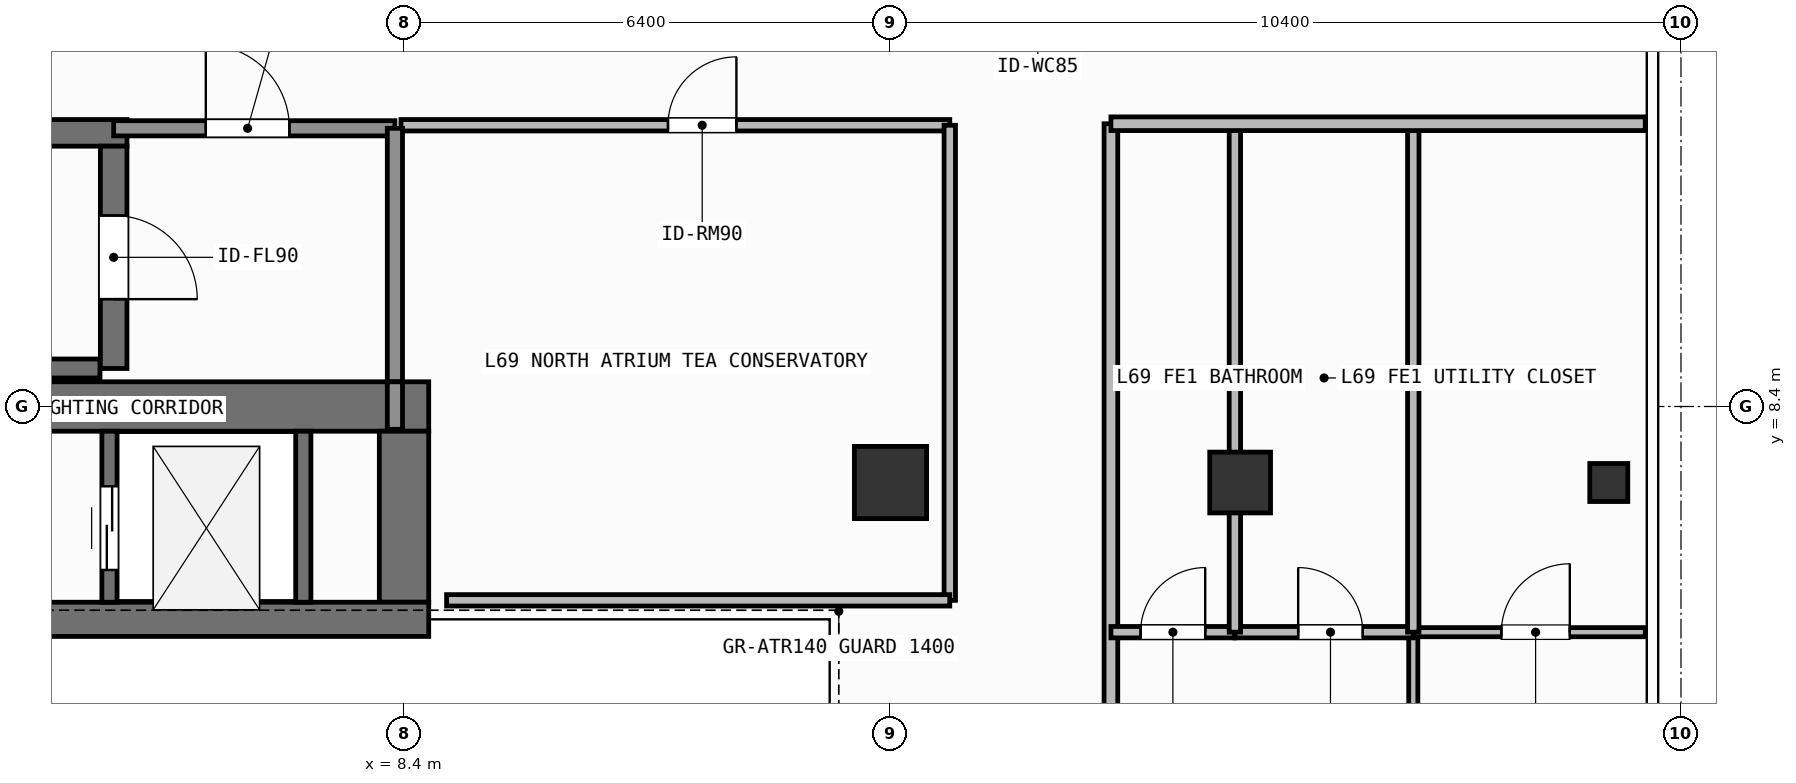
"""IFC4 building model, lengths in metres.
Left out: names, types, materials, properties, quantities, classifications, styles, units other than length and angle.
Written with IfcOpenShell. Run it as: python <this file> out.ifc"""

import sys

from ifc_helpers import new_model, si_unit, direction, frame, frame_2d, origin, origin_2d, place, context, subcontext, project, spatial, rectangle, hollow_rectangle, extrude, element, fill, save


model = new_model("IFC4")
c1 = context("Model", 3, precision=1e-05, world=origin(), true_north=direction((0.0, 1.0)))
c2 = subcontext(c1, "Body", "Model", "MODEL_VIEW")
j1 = project(units=[si_unit("LENGTHUNIT", "METRE"), si_unit("PLANEANGLEUNIT", "RADIAN")], contexts=[c1])
p1 = place(None, origin())
s1 = spatial("IfcSite", under=j1, at=p1, CompositionType="ELEMENT")
p2 = place(p1, origin())
s2 = spatial("IfcBuilding", under=s1, at=p2, CompositionType="ELEMENT")
p3 = place(p2, frame((0.0, 0.0, 282.0)))
s3 = spatial("IfcBuildingStorey", under=s2, at=p3, CompositionType="ELEMENT", Elevation=282.0)
p4 = place(p3, frame((-7.55, 8.4, 0.0), z_axis=(0.0, 0.0, 1.0), x_axis=(1.0, 0.0, 0.0)))
e1 = element("IfcWall", 1, at=p4, inside=s3, PredefinedType="SHEAR", context=c2, shape_type="SweptSolid", body=[
    extrude(rectangle(XDim=16.275, YDim=0.65, at=frame_2d((8.138, 0.0))), origin(), (0.0, 0.0, 1.0), 3.9),
])
p5 = place(p3, frame((8.4, 5.825, 0.0), z_axis=(0.0, 0.0, 1.0), x_axis=(0.0, 1.0, 0.0)))
e2 = element("IfcWall", 2, at=p5, inside=s3, PredefinedType="SHEAR", context=c2, shape_type="SweptSolid", body=[
    extrude(rectangle(XDim=2.25, YDim=0.65, at=frame_2d((1.125, 0.0))), origin(), (0.0, 0.0, 1.0), 3.9),
])
p6 = place(p3, frame((3.045, 5.6, 0.0), z_axis=(0.0, 0.0, 1.0), x_axis=(1.0, 0.0, 0.0)))
e3 = element("IfcWall", 3, at=p6, inside=s3, PredefinedType="SHEAR", context=c2, shape_type="SweptSolid", body=[
    extrude(rectangle(XDim=5.68, YDim=0.45, at=frame_2d((2.84, 0.0))), origin(), (0.0, 0.0, 1.0), 3.9),
])
p7 = place(p3, frame((-2.555, 12.0, 0.0), z_axis=(0.0, 0.0, 1.0), x_axis=(1.0, 0.0, 0.0)))
e4 = element("IfcWall", 4, at=p7, inside=s3, PredefinedType="SHEAR", context=c2, shape_type="SweptSolid", body=[
    extrude(rectangle(XDim=7.31, YDim=0.35, at=frame_2d((3.655, 0.0))), origin(), (0.0, 0.0, 1.0), 3.9),
])
p8 = place(p3, frame((-2.2, 8.9, 0.0), z_axis=(0.0, 0.0, 1.0), x_axis=(1.0, 0.0, 0.0)))
e5 = element("IfcWall", 5, at=p8, inside=s3, PredefinedType="SHEAR", context=c2, shape_type="SweptSolid", body=[
    extrude(rectangle(XDim=6.6, YDim=0.25, at=frame_2d((3.3, 0.0))), origin(), (0.0, 0.0, 1.0), 3.9),
])
p9 = place(p3, frame((4.58, 11.825, 0.0), z_axis=(0.0, 0.0, 1.0), x_axis=(0.0, -1.0, 0.0)))
e6 = element("IfcWall", 6, at=p9, inside=s3, PredefinedType="SHEAR", context=c2, shape_type="SweptSolid", body=[
    extrude(rectangle(XDim=2.925, YDim=0.35, at=frame_2d((1.462, 0.0))), origin(), (0.0, 0.0, 1.0), 3.9),
])
p10 = place(p9, frame((0.913, 0.0, 0.0)))
e7 = element("IfcOpeningElement", 7, at=p10, cuts=e6, PredefinedType="OPENING", context=c2, shape_type="SweptSolid", body=[
    extrude(rectangle(XDim=1.1, YDim=2.15, at=frame_2d((0.55, 1.075))), frame((0.0, 0.185, 0.0), z_axis=(0.0, -1.0, 0.0), x_axis=(1.0, 0.0, 0.0)), (0.0, 0.0, 1.0), 0.37),
])
p11 = place(p3, frame((14.8, 7.4, 0.0), z_axis=(0.0, 0.0, 1.0), x_axis=(1.0, 0.0, 0.0)))
e8 = element("IfcColumn", 8, at=p11, inside=s3, PredefinedType="COLUMN", context=c2, shape_type="SweptSolid", body=[
    extrude(rectangle(XDim=0.95, YDim=0.95, at=origin_2d()), origin(), (0.0, 0.0, 1.0), 3.9),
])
p12 = place(p3, frame((19.4, 7.4, 0.0), z_axis=(0.0, 0.0, 1.0), x_axis=(1.0, 0.0, 0.0)))
e9 = element("IfcColumn", 9, at=p12, inside=s3, PredefinedType="COLUMN", context=c2, shape_type="SweptSolid", body=[
    extrude(hollow_rectangle(XDim=0.8, YDim=0.8, WallThickness=0.036, at=origin_2d()), origin(), (0.0, 0.0, 1.0), 3.9),
])
p13 = place(p3, frame((24.25, 7.4, 0.0), z_axis=(0.0, 0.0, 1.0), x_axis=(1.0, 0.0, 0.0)))
e10 = element("IfcColumn", 10, at=p13, inside=s3, PredefinedType="COLUMN", context=c2, shape_type="SweptSolid", body=[
    extrude(hollow_rectangle(XDim=0.5, YDim=0.5, WallThickness=0.025, at=origin_2d()), origin(), (0.0, 0.0, 1.0), 3.9),
])
p14 = place(p3, frame((4.525, 5.825, 0.0), z_axis=(0.0, 0.0, 1.0), x_axis=(0.0, 1.0, 0.0)))
e11 = element("IfcWall", 11, at=p14, inside=s3, PredefinedType="SHEAR", context=c2, shape_type="SweptSolid", body=[
    extrude(rectangle(XDim=2.25, YDim=0.2, at=frame_2d((1.125, 0.0))), origin(), (0.0, 0.0, 1.0), 3.62),
])
p15 = place(p14, frame((0.425, 0.0, 0.0)))
e12 = element("IfcOpeningElement", 12, at=p15, cuts=e11, PredefinedType="OPENING", context=c2, shape_type="SweptSolid", body=[
    extrude(rectangle(XDim=1.1, YDim=2.2, at=frame_2d((0.55, 1.1))), frame((0.0, 0.11, 0.0), z_axis=(0.0, -1.0, 0.0), x_axis=(1.0, 0.0, 0.0)), (0.0, 0.0, 1.0), 0.22),
])
p16 = place(p3, frame((7.075, 5.825, 0.0), z_axis=(0.0, 0.0, 1.0), x_axis=(0.0, 1.0, 0.0)))
e13 = element("IfcWall", 13, at=p16, inside=s3, PredefinedType="SHEAR", context=c2, shape_type="SweptSolid", body=[
    extrude(rectangle(XDim=2.25, YDim=0.2, at=frame_2d((1.125, 0.0))), origin(), (0.0, 0.0, 1.0), 3.62),
])
p17 = place(p3, frame((4.58, 12.06, 0.0), z_axis=(0.0, 0.0, 1.0), x_axis=(1.0, 0.0, 0.0)))
e14 = element("IfcWall", 14, at=p17, inside=s3, PredefinedType="SOLIDWALL", context=c2, shape_type="SweptSolid", body=[
    extrude(rectangle(XDim=3.7, YDim=0.2, at=frame_2d((1.85, 0.0))), origin(), (0.0, 0.0, 1.0), 3.62),
])
p18 = place(p17, frame((1.212, 0.0, 0.0)))
e15 = element("IfcOpeningElement", 15, at=p18, cuts=e14, PredefinedType="OPENING", context=c2, shape_type="SweptSolid", body=[
    extrude(rectangle(XDim=1.1, YDim=2.15, at=frame_2d((0.55, 1.075))), frame((0.0, 0.11, 0.0), z_axis=(0.0, -1.0, 0.0), x_axis=(1.0, 0.0, 0.0)), (0.0, 0.0, 1.0), 0.22),
])
p19 = place(p3, frame((8.36, 12.1, 0.0), z_axis=(0.0, 0.0, 1.0), x_axis=(1.0, 0.0, 0.0)))
e16 = element("IfcWall", 16, at=p19, inside=s3, PredefinedType="PARTITIONING", context=c2, shape_type="SweptSolid", body=[
    extrude(rectangle(XDim=7.22, YDim=0.15, at=frame_2d((3.61, 0.0))), origin(), (0.0, 0.0, 1.0), 3.62),
])
p20 = place(p19, frame((3.513, 0.0, 0.0)))
e17 = element("IfcOpeningElement", 17, at=p20, cuts=e16, PredefinedType="OPENING", context=c2, shape_type="SweptSolid", body=[
    extrude(rectangle(XDim=0.9, YDim=2.1, at=frame_2d((0.45, 1.05))), frame((0.0, 0.085, 0.0), z_axis=(0.0, -1.0, 0.0), x_axis=(1.0, 0.0, 0.0)), (0.0, 0.0, 1.0), 0.17),
])
p21 = place(p3, frame((17.7, -12.12, 0.0), z_axis=(0.0, 0.0, 1.0), x_axis=(0.0, 1.0, 0.0)))
e18 = element("IfcWall", 18, at=p21, inside=s3, PredefinedType="PARTITIONING", context=c2, shape_type="SweptSolid", body=[
    extrude(rectangle(XDim=24.24, YDim=0.18, at=frame_2d((12.12, 0.0))), origin(), (0.0, 0.0, 1.0), 3.62),
])
p22 = place(p21, frame((11.62, 0.0, 0.0)))
e19 = element("IfcOpeningElement", 19, at=p22, cuts=e18, PredefinedType="OPENING", context=c2, shape_type="SweptSolid", body=[
    extrude(rectangle(XDim=1.0, YDim=2.2, at=frame_2d((0.5, 1.1))), frame((0.0, 0.1, 0.0), z_axis=(0.0, -1.0, 0.0), x_axis=(1.0, 0.0, 0.0)), (0.0, 0.0, 1.0), 0.2),
])
p23 = place(p3, frame((21.678, -5.431, 0.0), z_axis=(0.0, 0.0, 1.0), x_axis=(0.0, 1.0, 0.0)))
e20 = element("IfcWall", 20, at=p23, inside=s3, PredefinedType="PARTITIONING", context=c2, shape_type="SweptSolid", body=[
    extrude(rectangle(XDim=10.862, YDim=0.12, at=frame_2d((5.431, 0.0))), origin(), (0.0, 0.0, 1.0), 3.62),
])
p24 = place(p23, frame((4.981, 0.0, 0.0)))
e21 = element("IfcOpeningElement", 21, at=p24, cuts=e20, PredefinedType="OPENING", context=c2, shape_type="SweptSolid", body=[
    extrude(rectangle(XDim=0.9, YDim=2.1, at=frame_2d((0.45, 1.05))), frame((0.0, 0.07, 0.0), z_axis=(0.0, -1.0, 0.0), x_axis=(1.0, 0.0, 0.0)), (0.0, 0.0, 1.0), 0.14),
])
p25 = place(p3, frame((17.7, 5.431, 0.0), z_axis=(0.0, 0.0, 1.0), x_axis=(1.0, 0.0, 0.0)))
e22 = element("IfcWall", 22, at=p25, inside=s3, PredefinedType="PARTITIONING", context=c2, shape_type="SweptSolid", body=[
    extrude(rectangle(XDim=1.631, YDim=0.15, at=frame_2d((0.815, 0.0))), origin(), (0.0, 0.0, 1.0), 3.62),
])
p26 = place(p25, frame((0.39, 0.0, 0.0)))
e23 = element("IfcOpeningElement", 23, at=p26, cuts=e22, PredefinedType="OPENING", context=c2, shape_type="SweptSolid", body=[
    extrude(rectangle(XDim=0.85, YDim=2.1, at=frame_2d((0.425, 1.05))), frame((0.0, 0.085, 0.0), z_axis=(0.0, -1.0, 0.0), x_axis=(1.0, 0.0, 0.0)), (0.0, 0.0, 1.0), 0.17),
])
p27 = place(p3, frame((19.331, 5.431, 0.0), z_axis=(0.0, 0.0, 1.0), x_axis=(1.0, 0.0, 0.0)))
e24 = element("IfcWall", 24, at=p27, inside=s3, PredefinedType="PARTITIONING", context=c2, shape_type="SweptSolid", body=[
    extrude(rectangle(XDim=2.347, YDim=0.15, at=frame_2d((1.173, 0.0))), origin(), (0.0, 0.0, 1.0), 3.62),
])
p28 = place(p27, frame((0.833, 0.0, 0.0)))
e25 = element("IfcOpeningElement", 25, at=p28, cuts=e24, PredefinedType="OPENING", context=c2, shape_type="SweptSolid", body=[
    extrude(rectangle(XDim=0.85, YDim=2.1, at=frame_2d((0.425, 1.05))), frame((0.0, 0.085, 0.0), z_axis=(0.0, -1.0, 0.0), x_axis=(1.0, 0.0, 0.0)), (0.0, 0.0, 1.0), 0.17),
])
p29 = place(p3, frame((21.678, 5.431, 0.0), z_axis=(0.0, 0.0, 1.0), x_axis=(1.0, 0.0, 0.0)))
e26 = element("IfcWall", 26, at=p29, inside=s3, PredefinedType="PARTITIONING", context=c2, shape_type="SweptSolid", body=[
    extrude(rectangle(XDim=3.052, YDim=0.12, at=frame_2d((1.526, 0.0))), origin(), (0.0, 0.0, 1.0), 3.62),
])
p30 = place(p29, frame((1.159, 0.0, 0.0)))
e27 = element("IfcOpeningElement", 27, at=p30, cuts=e26, PredefinedType="OPENING", context=c2, shape_type="SweptSolid", body=[
    extrude(rectangle(XDim=0.9, YDim=2.1, at=frame_2d((0.45, 1.05))), frame((0.0, 0.07, 0.0), z_axis=(0.0, -1.0, 0.0), x_axis=(1.0, 0.0, 0.0)), (0.0, 0.0, 1.0), 0.14),
])
p31 = place(p3, frame((8.28, 8.725, 0.0), z_axis=(0.0, 0.0, 1.0), x_axis=(0.0, 1.0, 0.0)))
e28 = element("IfcWall", 28, at=p31, inside=s3, PredefinedType="SOLIDWALL", context=c2, shape_type="SweptSolid", body=[
    extrude(rectangle(XDim=3.335, YDim=0.2, at=frame_2d((1.667, 0.0))), origin(), (0.0, 0.0, 1.0), 3.62),
])
p32 = place(p3, frame((8.28, 8.1, 0.0), z_axis=(0.0, 0.0, 1.0), x_axis=(0.0, 1.0, 0.0)))
e29 = element("IfcWall", 29, at=p32, inside=s3, PredefinedType="SOLIDWALL", context=c2, shape_type="SweptSolid", body=[
    extrude(rectangle(XDim=0.625, YDim=0.2, at=frame_2d((0.312, 0.0))), origin(), (0.0, 0.0, 1.0), 3.62),
])
p33 = place(p3, frame((15.58, 5.85, 0.0), z_axis=(0.0, 0.0, 1.0), x_axis=(0.0, 1.0, 0.0)))
e30 = element("IfcWall", 30, at=p33, inside=s3, PredefinedType="PARTITIONING", context=c2, shape_type="SweptSolid", body=[
    extrude(rectangle(XDim=6.25, YDim=0.15, at=frame_2d((3.125, 0.0))), origin(), (0.0, 0.0, 1.0), 3.62),
])
p34 = place(p3, frame((8.96, 5.85, 0.0), z_axis=(0.0, 0.0, 1.0), x_axis=(1.0, 0.0, 0.0)))
e31 = element("IfcWall", 31, at=p34, inside=s3, PredefinedType="PARTITIONING", context=c2, shape_type="SweptSolid", body=[
    extrude(rectangle(XDim=6.62, YDim=0.15, at=frame_2d((3.31, 0.0))), origin(), (0.0, 0.0, 1.0), 3.62),
])
for number, where, z_axis, x_axis in (
    (32, (19.331, 5.431, 0.0), (0.0, 0.0, 1.0), (0.0, 1.0, 0.0)),
    (33, (21.678, 5.431, 0.0), (0.0, 0.0, 1.0), (0.0, 1.0, 0.0)),
):
    element("IfcWall", number, at=place(p3, frame(where, z_axis=z_axis, x_axis=x_axis)), inside=s3, PredefinedType="PARTITIONING", context=c2, shape_type="SweptSolid", body=[
        extrude(rectangle(XDim=6.689, YDim=0.15, at=frame_2d((3.345, 0.0))), origin(), (0.0, 0.0, 1.0), 3.62),
    ])
p35 = place(p3, frame((17.7, 12.12, 0.0), z_axis=(0.0, 0.0, 1.0), x_axis=(1.0, 0.0, 0.0)))
e34 = element("IfcWall", 34, at=p35, inside=s3, PredefinedType="PARTITIONING", context=c2, shape_type="SweptSolid", body=[
    extrude(rectangle(XDim=7.03, YDim=0.18, at=frame_2d((3.515, 0.0))), origin(), (0.0, 0.0, 1.0), 3.62),
])
p36 = place(p15, origin())
e35 = element("IfcDoor", 35, at=p36, inside=s3, OperationType="SLIDING_TO_LEFT", PredefinedType="DOOR", context=c2, shape_type="SweptSolid", body=[
    extrude(rectangle(XDim=1.1, YDim=2.2, at=frame_2d((0.55, 1.1))), frame((0.0, 0.025, 0.0), z_axis=(0.0, -1.0, 0.0), x_axis=(1.0, 0.0, 0.0)), (0.0, 0.0, 1.0), 0.05),
])
fill(e12, e35)
p37 = place(p10, origin())
e36 = element("IfcDoor", 36, at=p37, inside=s3, OperationType="SINGLE_SWING_RIGHT", PredefinedType="DOOR", context=c2, shape_type="SweptSolid", body=[
    extrude(rectangle(XDim=1.1, YDim=2.15, at=frame_2d((0.55, 1.075))), frame((0.0, 0.025, 0.0), z_axis=(0.0, -1.0, 0.0), x_axis=(1.0, 0.0, 0.0)), (0.0, 0.0, 1.0), 0.05),
])
fill(e7, e36)
p38 = place(p18, origin())
e37 = element("IfcDoor", 37, at=p38, inside=s3, OperationType="SINGLE_SWING_LEFT", PredefinedType="DOOR", context=c2, shape_type="SweptSolid", body=[
    extrude(rectangle(XDim=1.1, YDim=2.15, at=frame_2d((0.55, 1.075))), frame((0.0, 0.025, 0.0), z_axis=(0.0, -1.0, 0.0), x_axis=(1.0, 0.0, 0.0)), (0.0, 0.0, 1.0), 0.05),
])
fill(e15, e37)
p39 = place(p20, origin())
e38 = element("IfcDoor", 38, at=p39, inside=s3, OperationType="SINGLE_SWING_RIGHT", PredefinedType="DOOR", context=c2, shape_type="SweptSolid", body=[
    extrude(rectangle(XDim=0.9, YDim=2.1, at=frame_2d((0.45, 1.05))), frame((0.0, 0.025, 0.0), z_axis=(0.0, -1.0, 0.0), x_axis=(1.0, 0.0, 0.0)), (0.0, 0.0, 1.0), 0.05),
])
fill(e17, e38)
p40 = place(p26, origin())
e39 = element("IfcDoor", 39, at=p40, inside=s3, OperationType="SINGLE_SWING_RIGHT", PredefinedType="DOOR", context=c2, shape_type="SweptSolid", body=[
    extrude(rectangle(XDim=0.85, YDim=2.1, at=frame_2d((0.425, 1.05))), frame((0.0, 0.025, 0.0), z_axis=(0.0, -1.0, 0.0), x_axis=(1.0, 0.0, 0.0)), (0.0, 0.0, 1.0), 0.05),
])
fill(e23, e39)
p41 = place(p28, origin())
e40 = element("IfcDoor", 40, at=p41, inside=s3, OperationType="SINGLE_SWING_LEFT", PredefinedType="DOOR", context=c2, shape_type="SweptSolid", body=[
    extrude(rectangle(XDim=0.85, YDim=2.1, at=frame_2d((0.425, 1.05))), frame((0.0, 0.025, 0.0), z_axis=(0.0, -1.0, 0.0), x_axis=(1.0, 0.0, 0.0)), (0.0, 0.0, 1.0), 0.05),
])
fill(e25, e40)
p42 = place(p30, origin())
e41 = element("IfcDoor", 41, at=p42, inside=s3, OperationType="SINGLE_SWING_RIGHT", PredefinedType="DOOR", context=c2, shape_type="SweptSolid", body=[
    extrude(rectangle(XDim=0.9, YDim=2.1, at=frame_2d((0.45, 1.05))), frame((0.0, 0.025, 0.0), z_axis=(0.0, -1.0, 0.0), x_axis=(1.0, 0.0, 0.0)), (0.0, 0.0, 1.0), 0.05),
])
fill(e27, e41)
save(model, sys.argv[1])
